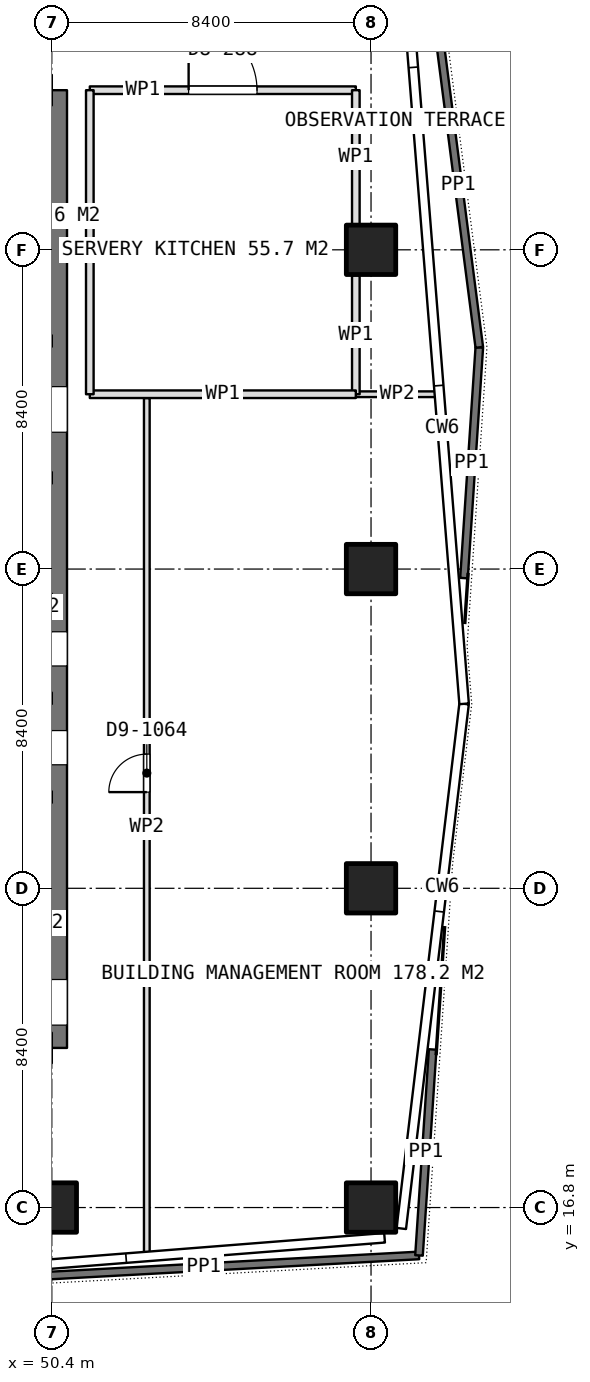
"""IFC4 building model, lengths in metres.
Left out: names, types, materials, properties, quantities, classifications, styles, units other than length and angle.
Written with IfcOpenShell. Run it as: python <this file> out.ifc"""

import sys

from ifc_helpers import new_model, si_unit, direction, frame, frame_2d, origin, origin_2d, place, context, subcontext, project, spatial, rectangle, extrude, element, fill, save


model = new_model("IFC4")
c1 = context("Model", 3, precision=1e-05, world=origin(), true_north=direction((0.0, 1.0)))
c2 = subcontext(c1, "Body", "Model", "MODEL_VIEW")
j1 = project(units=[si_unit("LENGTHUNIT", "METRE"), si_unit("PLANEANGLEUNIT", "RADIAN")], contexts=[c1])
p1 = place(None, origin())
s1 = spatial("IfcSite", under=j1, at=p1, CompositionType="ELEMENT")
p2 = place(p1, origin())
s2 = spatial("IfcBuilding", under=s1, at=p2, CompositionType="ELEMENT")
p3 = place(p2, frame((0.0, 0.0, 291.35)))
s3 = spatial("IfcBuildingStorey", under=s2, at=p3, CompositionType="ELEMENT", Elevation=291.35)
p4 = place(p3, frame((50.4, 21.0, 0.0), z_axis=(0.0, 0.0, 1.0), x_axis=(0.0, 1.0, 0.0)))
e1 = element("IfcWall", 1, at=p4, inside=s3, PredefinedType="SHEAR", context=c2, shape_type="SweptSolid", body=[
    extrude(rectangle(XDim=25.2, YDim=0.8, at=frame_2d((12.6, 0.0))), origin(), (0.0, 0.0, 1.0), 5.4),
])
p5 = place(p4, frame((16.2, 0.0, 0.0)))
e2 = element("IfcOpeningElement", 2, at=p5, cuts=e1, PredefinedType="OPENING", context=c2, shape_type="SweptSolid", body=[
    extrude(rectangle(XDim=1.2, YDim=2.1, at=frame_2d((0.6, 1.05))), frame((0.0, 0.41, 0.0), z_axis=(0.0, -1.0, 0.0), x_axis=(1.0, 0.0, 0.0)), (0.0, 0.0, 1.0), 0.82),
])
p6 = place(p4, frame((10.05, 0.0, 0.0)))
e3 = element("IfcOpeningElement", 3, at=p6, cuts=e1, PredefinedType="OPENING", context=c2, shape_type="SweptSolid", body=[
    extrude(rectangle(XDim=0.9, YDim=2.1, at=frame_2d((0.45, 1.05))), frame((0.0, 0.41, 0.0), z_axis=(0.0, -1.0, 0.0), x_axis=(1.0, 0.0, 0.0)), (0.0, 0.0, 1.0), 0.82),
])
p7 = place(p4, frame((7.45, 0.0, 0.0)))
e4 = element("IfcOpeningElement", 4, at=p7, cuts=e1, PredefinedType="OPENING", context=c2, shape_type="SweptSolid", body=[
    extrude(rectangle(XDim=0.9, YDim=2.1, at=frame_2d((0.45, 1.05))), frame((0.0, 0.41, 0.0), z_axis=(0.0, -1.0, 0.0), x_axis=(1.0, 0.0, 0.0)), (0.0, 0.0, 1.0), 0.82),
])
p8 = place(p4, frame((0.6, 0.0, 0.0)))
e5 = element("IfcOpeningElement", 5, at=p8, cuts=e1, PredefinedType="OPENING", context=c2, shape_type="SweptSolid", body=[
    extrude(rectangle(XDim=1.2, YDim=2.1, at=frame_2d((0.6, 1.05))), frame((0.0, 0.41, 0.0), z_axis=(0.0, -1.0, 0.0), x_axis=(1.0, 0.0, 0.0)), (0.0, 0.0, 1.0), 0.82),
])
for number, where, z_axis, x_axis in (
    (6, (50.4, 16.8, 0.0), (0.0, 0.0, 1.0), (1.0, 0.0, 0.0)),
    (7, (58.8, 16.8, 0.0), (0.0, 0.0, 1.0), (1.0, 0.0, 0.0)),
    (8, (58.8, 25.2, 0.0), (0.0, 0.0, 1.0), (1.0, 0.0, 0.0)),
    (9, (58.8, 33.6, 0.0), (0.0, 0.0, 1.0), (1.0, 0.0, 0.0)),
    (10, (58.8, 42.0, 0.0), (0.0, 0.0, 1.0), (1.0, 0.0, 0.0)),
):
    element("IfcColumn", number, at=place(p3, frame(where, z_axis=z_axis, x_axis=x_axis)), inside=s3, PredefinedType="COLUMN", context=c2, shape_type="SweptSolid", body=[
        extrude(rectangle(XDim=1.3, YDim=1.3, at=origin_2d()), origin(), (0.0, 0.0, 1.0), 5.4),
    ])
p9 = place(p3, frame((48.737, 14.923, 0.0), z_axis=(0.0, 0.0, 1.0), x_axis=(0.998519515353, 0.054394645497, 0.0)))
e11 = element("IfcWall", 11, at=p9, inside=s3, PredefinedType="PARAPET", context=c2, shape_type="SweptSolid", body=[
    extrude(rectangle(XDim=11.342, YDim=0.2, at=frame_2d((5.671, 0.0))), origin(), (0.0, 0.0, 1.0), 1.1),
])
p10 = place(p3, frame((60.062, 15.54, 0.0), z_axis=(0.0, 0.0, 1.0), x_axis=(0.066256467733, 0.997802626016, 0.0)))
e12 = element("IfcWall", 12, at=p10, inside=s3, PredefinedType="PARAPET", context=c2, shape_type="SweptSolid", body=[
    extrude(rectangle(XDim=5.431, YDim=0.2, at=frame_2d((2.716, 0.0))), origin(), (0.0, 0.0, 1.0), 1.1),
])
p11 = place(p3, frame((61.246, 33.362, 0.0), z_axis=(0.0, 0.0, 1.0), x_axis=(0.066276696506, 0.997801282571, 0.0)))
e13 = element("IfcWall", 13, at=p11, inside=s3, PredefinedType="PARAPET", context=c2, shape_type="SweptSolid", body=[
    extrude(rectangle(XDim=6.085, YDim=0.2, at=frame_2d((3.043, 0.0))), origin(), (0.0, 0.0, 1.0), 1.1),
])
p12 = place(p3, frame((61.649, 39.434, 0.0), z_axis=(0.0, 0.0, 1.0), x_axis=(-0.127868272166, 0.991791159959, 0.0)))
e14 = element("IfcWall", 14, at=p12, inside=s3, PredefinedType="PARAPET", context=c2, shape_type="SweptSolid", body=[
    extrude(rectangle(XDim=12.326, YDim=0.2, at=frame_2d((6.163, 0.0))), origin(), (0.0, 0.0, 1.0), 1.1),
])
p13 = place(p3, frame((51.4, 46.2, 0.0), z_axis=(0.0, 0.0, 1.0), x_axis=(1.0, 0.0, 0.0)))
e15 = element("IfcWall", 15, at=p13, inside=s3, PredefinedType="PARTITIONING", context=c2, shape_type="SweptSolid", body=[
    extrude(rectangle(XDim=7.0, YDim=0.2, at=frame_2d((3.5, 0.0))), origin(), (0.0, 0.0, 1.0), 5.1),
])
p14 = place(p13, frame((2.6, 0.0, 0.0)))
e16 = element("IfcOpeningElement", 16, at=p14, cuts=e15, PredefinedType="OPENING", context=c2, shape_type="SweptSolid", body=[
    extrude(rectangle(XDim=1.8, YDim=2.1, at=frame_2d((0.9, 1.05))), frame((0.0, 0.11, 0.0), z_axis=(0.0, -1.0, 0.0), x_axis=(1.0, 0.0, 0.0)), (0.0, 0.0, 1.0), 0.22),
])
p15 = place(p3, frame((58.4, 46.2, 0.0), z_axis=(0.0, 0.0, 1.0), x_axis=(0.0, -1.0, 0.0)))
e17 = element("IfcWall", 17, at=p15, inside=s3, PredefinedType="PARTITIONING", context=c2, shape_type="SweptSolid", body=[
    extrude(rectangle(XDim=3.53, YDim=0.2, at=frame_2d((1.765, 0.0))), origin(), (0.0, 0.0, 1.0), 5.1),
])
p16 = place(p3, frame((58.4, 41.33, 0.0), z_axis=(0.0, 0.0, 1.0), x_axis=(0.0, -1.0, 0.0)))
e18 = element("IfcWall", 18, at=p16, inside=s3, PredefinedType="PARTITIONING", context=c2, shape_type="SweptSolid", body=[
    extrude(rectangle(XDim=3.13, YDim=0.2, at=frame_2d((1.565, 0.0))), origin(), (0.0, 0.0, 1.0), 5.1),
])
p17 = place(p3, frame((58.4, 38.2, 0.0), z_axis=(0.0, 0.0, 1.0), x_axis=(-1.0, 0.0, 0.0)))
e19 = element("IfcWall", 19, at=p17, inside=s3, PredefinedType="PARTITIONING", context=c2, shape_type="SweptSolid", body=[
    extrude(rectangle(XDim=7.0, YDim=0.2, at=frame_2d((3.5, 0.0))), origin(), (0.0, 0.0, 1.0), 5.1),
])
p18 = place(p3, frame((51.4, 38.2, 0.0), z_axis=(0.0, 0.0, 1.0), x_axis=(0.0, 1.0, 0.0)))
e20 = element("IfcWall", 20, at=p18, inside=s3, PredefinedType="PARTITIONING", context=c2, shape_type="SweptSolid", body=[
    extrude(rectangle(XDim=8.0, YDim=0.2, at=frame_2d((4.0, 0.0))), origin(), (0.0, 0.0, 1.0), 5.1),
])
p19 = place(p3, frame((58.4, 38.2, 0.0), z_axis=(0.0, 0.0, 1.0), x_axis=(1.0, 0.0, 0.0)))
e21 = element("IfcWall", 21, at=p19, inside=s3, PredefinedType="PARTITIONING", context=c2, shape_type="SweptSolid", body=[
    extrude(rectangle(XDim=2.179, YDim=0.15, at=frame_2d((1.09, 0.0))), origin(), (0.0, 0.0, 1.0), 5.1),
])
p20 = place(p3, frame((52.9, 15.532, 0.0), z_axis=(0.0, 0.0, 1.0), x_axis=(0.0, 1.0, 0.0)))
e22 = element("IfcWall", 22, at=p20, inside=s3, PredefinedType="PARTITIONING", context=c2, shape_type="SweptSolid", body=[
    extrude(rectangle(XDim=22.568, YDim=0.15, at=frame_2d((11.284, 0.0))), origin(), (0.0, 0.0, 1.0), 5.1),
])
p21 = place(p20, frame((12.199, 0.0, 0.0)))
e23 = element("IfcOpeningElement", 23, at=p21, cuts=e22, PredefinedType="OPENING", context=c2, shape_type="SweptSolid", body=[
    extrude(rectangle(XDim=1.0, YDim=2.1, at=frame_2d((0.5, 1.05))), frame((0.0, 0.085, 0.0), z_axis=(0.0, -1.0, 0.0), x_axis=(1.0, 0.0, 0.0)), (0.0, 0.0, 1.0), 0.17),
])
p22 = place(p5, origin())
e24 = element("IfcDoor", 24, at=p22, inside=s3, OperationType="SINGLE_SWING_LEFT", PredefinedType="DOOR", context=c2, shape_type="SweptSolid", body=[
    extrude(rectangle(XDim=1.2, YDim=2.1, at=frame_2d((0.6, 1.05))), frame((0.0, 0.025, 0.0), z_axis=(0.0, -1.0, 0.0), x_axis=(1.0, 0.0, 0.0)), (0.0, 0.0, 1.0), 0.05),
])
fill(e2, e24)
p23 = place(p6, origin())
e25 = element("IfcDoor", 25, at=p23, inside=s3, OperationType="SINGLE_SWING_LEFT", PredefinedType="DOOR", context=c2, shape_type="SweptSolid", body=[
    extrude(rectangle(XDim=0.9, YDim=2.1, at=frame_2d((0.45, 1.05))), frame((0.0, 0.025, 0.0), z_axis=(0.0, -1.0, 0.0), x_axis=(1.0, 0.0, 0.0)), (0.0, 0.0, 1.0), 0.05),
])
fill(e3, e25)
p24 = place(p7, origin())
e26 = element("IfcDoor", 26, at=p24, inside=s3, OperationType="SINGLE_SWING_LEFT", PredefinedType="DOOR", context=c2, shape_type="SweptSolid", body=[
    extrude(rectangle(XDim=0.9, YDim=2.1, at=frame_2d((0.45, 1.05))), frame((0.0, 0.025, 0.0), z_axis=(0.0, -1.0, 0.0), x_axis=(1.0, 0.0, 0.0)), (0.0, 0.0, 1.0), 0.05),
])
fill(e4, e26)
p25 = place(p14, origin())
e27 = element("IfcDoor", 27, at=p25, inside=s3, OperationType="DOUBLE_DOOR_SINGLE_SWING", PredefinedType="DOOR", context=c2, shape_type="SweptSolid", body=[
    extrude(rectangle(XDim=1.8, YDim=2.1, at=frame_2d((0.9, 1.05))), frame((0.0, 0.025, 0.0), z_axis=(0.0, -1.0, 0.0), x_axis=(1.0, 0.0, 0.0)), (0.0, 0.0, 1.0), 0.05),
])
fill(e16, e27)
p26 = place(p21, origin())
e28 = element("IfcDoor", 28, at=p26, inside=s3, OperationType="SINGLE_SWING_LEFT", PredefinedType="DOOR", context=c2, shape_type="SweptSolid", body=[
    extrude(rectangle(XDim=1.0, YDim=2.1, at=frame_2d((0.5, 1.05))), frame((0.0, 0.025, 0.0), z_axis=(0.0, -1.0, 0.0), x_axis=(1.0, 0.0, 0.0)), (0.0, 0.0, 1.0), 0.05),
])
fill(e23, e28)
p27 = place(p8, origin())
e29 = element("IfcDoor", 29, at=p27, inside=s3, OperationType="SINGLE_SWING_RIGHT", PredefinedType="DOOR", context=c2, shape_type="SweptSolid", body=[
    extrude(rectangle(XDim=1.2, YDim=2.1, at=frame_2d((0.6, 1.05))), frame((0.0, 0.025, 0.0), z_axis=(0.0, -1.0, 0.0), x_axis=(1.0, 0.0, 0.0)), (0.0, 0.0, 1.0), 0.05),
])
fill(e5, e29)
save(model, sys.argv[1])
